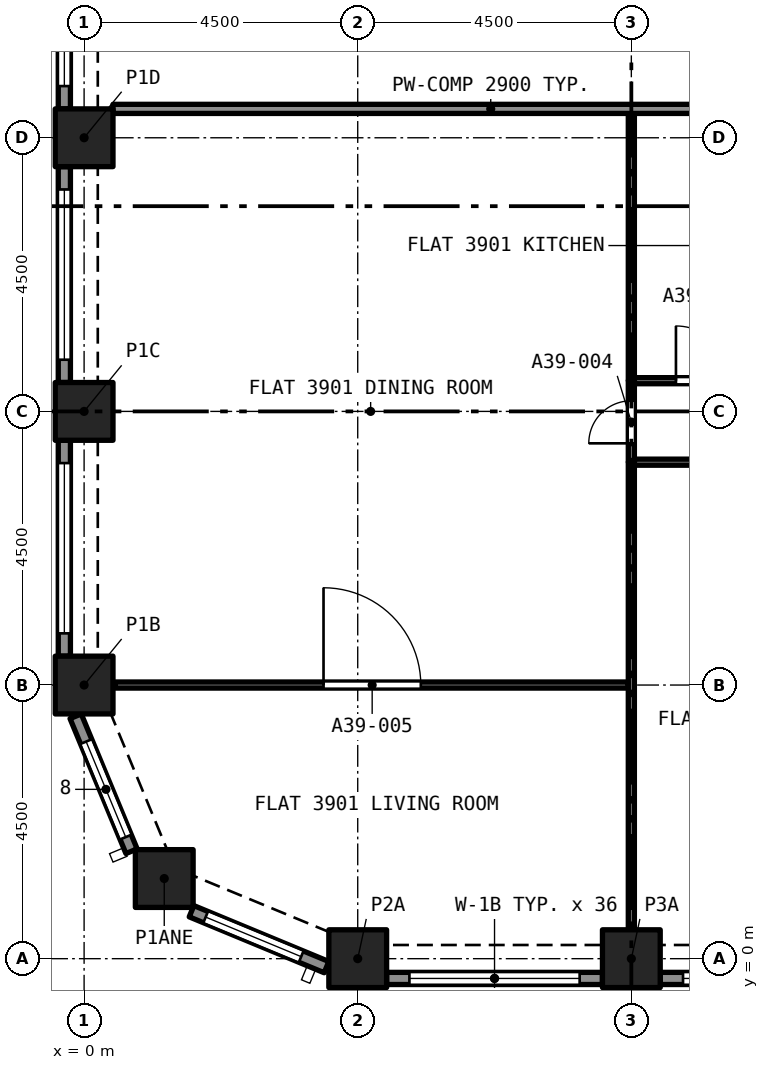
"""IFC4 building model, lengths in metres.
Left out: names, types, materials, properties, quantities, classifications, styles, units other than length and angle.
Written with IfcOpenShell. Run it as: python <this file> out.ifc"""

import sys

from ifc_helpers import new_model, si_unit, direction, frame, frame_2d, origin, origin_2d, place, context, subcontext, project, spatial, rectangle, extrude, element, fill, save


model = new_model("IFC4")
c1 = context("Model", 3, precision=1e-05, world=origin(), true_north=direction((0.0, 1.0)))
c2 = subcontext(c1, "Body", "Model", "MODEL_VIEW")
j1 = project(units=[si_unit("LENGTHUNIT", "METRE"), si_unit("PLANEANGLEUNIT", "RADIAN")], contexts=[c1])
p1 = place(None, origin())
s1 = spatial("IfcSite", under=j1, at=p1, CompositionType="ELEMENT")
p2 = place(p1, origin())
s2 = spatial("IfcBuilding", under=s1, at=p2, CompositionType="ELEMENT")
p3 = place(p2, frame((0.0, 0.0, 139.8)))
s3 = spatial("IfcBuildingStorey", under=s2, at=p3, CompositionType="ELEMENT", Elevation=139.8)
for number, where, z_axis, x_axis in (
    (1, (4.5, 0.0, 0.0), (0.0, 0.0, 1.0), (1.0, 0.0, 0.0)),
    (2, (9.0, 0.0, 0.0), (0.0, 0.0, 1.0), (1.0, 0.0, 0.0)),
    (3, (1.318, 1.318, 0.0), (0.0, 0.0, 1.0), (1.0, 0.0, 0.0)),
    (4, (0.0, 4.5, 0.0), (0.0, 0.0, 1.0), (1.0, 0.0, 0.0)),
    (5, (0.0, 9.0, 0.0), (0.0, 0.0, 1.0), (1.0, 0.0, 0.0)),
    (6, (0.0, 13.5, 0.0), (0.0, 0.0, 1.0), (1.0, 0.0, 0.0)),
):
    element("IfcColumn", number, at=place(p3, frame(where, z_axis=z_axis, x_axis=x_axis)), inside=s3, PredefinedType="COLUMN", context=c2, shape_type="SweptSolid", body=[
        extrude(rectangle(XDim=0.95, YDim=0.95, at=origin_2d()), origin(), (0.0, 0.0, 1.0), 3.2),
    ])
p4 = place(p3, frame((0.78, 1.767, 0.0), z_axis=(0.0, 0.0, 1.0), x_axis=(-0.382680855588, 0.923880599843, 0.0)))
e7 = element("IfcWall", 7, at=p4, inside=s3, PredefinedType="SOLIDWALL", context=c2, shape_type="SweptSolid", body=[
    extrude(rectangle(XDim=2.403, YDim=0.2, at=frame_2d((1.201, 0.0))), origin(), (0.0, 0.0, 1.0), 3.2),
])
p5 = place(p4, frame((0.251, 0.0, 0.45)))
e8 = element("IfcOpeningElement", 8, at=p5, cuts=e7, PredefinedType="OPENING", context=c2, shape_type="SweptSolid", body=[
    extrude(rectangle(XDim=1.7, YDim=1.95, at=frame_2d((0.85, 0.975))), frame((0.0, 0.11, 0.0), z_axis=(0.0, -1.0, 0.0), x_axis=(1.0, 0.0, 0.0)), (0.0, 0.0, 1.0), 0.22),
])
p6 = place(p3, frame((3.987, -0.139, 0.0), z_axis=(0.0, 0.0, 1.0), x_axis=(-0.923880599843, 0.382680855588, 0.0)))
e9 = element("IfcWall", 9, at=p6, inside=s3, PredefinedType="SOLIDWALL", context=c2, shape_type="SweptSolid", body=[
    extrude(rectangle(XDim=2.403, YDim=0.2, at=frame_2d((1.201, 0.0))), origin(), (0.0, 0.0, 1.0), 3.2),
])
p7 = place(p6, frame((0.451, 0.0, 0.45)))
e10 = element("IfcOpeningElement", 10, at=p7, cuts=e9, PredefinedType="OPENING", context=c2, shape_type="SweptSolid", body=[
    extrude(rectangle(XDim=1.7, YDim=1.95, at=frame_2d((0.85, 0.975))), frame((0.0, 0.11, 0.0), z_axis=(0.0, -1.0, 0.0), x_axis=(1.0, 0.0, 0.0)), (0.0, 0.0, 1.0), 0.22),
])
p8 = place(p3, frame((8.525, -0.325, 0.0), z_axis=(0.0, 0.0, 1.0), x_axis=(-1.0, 0.0, 0.0)))
e11 = element("IfcWall", 11, at=p8, inside=s3, PredefinedType="SOLIDWALL", context=c2, shape_type="SweptSolid", body=[
    extrude(rectangle(XDim=3.55, YDim=0.2, at=frame_2d((1.775, 0.0))), origin(), (0.0, 0.0, 1.0), 3.2),
])
p9 = place(p8, frame((0.375, 0.0, 0.45)))
e12 = element("IfcOpeningElement", 12, at=p9, cuts=e11, PredefinedType="OPENING", context=c2, shape_type="SweptSolid", body=[
    extrude(rectangle(XDim=2.8, YDim=1.95, at=frame_2d((1.4, 0.975))), frame((0.0, 0.11, 0.0), z_axis=(0.0, -1.0, 0.0), x_axis=(1.0, 0.0, 0.0)), (0.0, 0.0, 1.0), 0.22),
])
p10 = place(p3, frame((13.025, -0.325, 0.0), z_axis=(0.0, 0.0, 1.0), x_axis=(-1.0, 0.0, 0.0)))
e13 = element("IfcWall", 13, at=p10, inside=s3, PredefinedType="SOLIDWALL", context=c2, shape_type="SweptSolid", body=[
    extrude(rectangle(XDim=3.55, YDim=0.2, at=frame_2d((1.775, 0.0))), origin(), (0.0, 0.0, 1.0), 3.2),
])
p11 = place(p10, frame((0.375, 0.0, 0.45)))
e14 = element("IfcOpeningElement", 14, at=p11, cuts=e13, PredefinedType="OPENING", context=c2, shape_type="SweptSolid", body=[
    extrude(rectangle(XDim=2.8, YDim=1.95, at=frame_2d((1.4, 0.975))), frame((0.0, 0.11, 0.0), z_axis=(0.0, -1.0, 0.0), x_axis=(1.0, 0.0, 0.0)), (0.0, 0.0, 1.0), 0.22),
])
p12 = place(p3, frame((-0.325, 13.975, 0.0), z_axis=(0.0, 0.0, 1.0), x_axis=(0.0, 1.0, 0.0)))
e15 = element("IfcWall", 15, at=p12, inside=s3, PredefinedType="SOLIDWALL", context=c2, shape_type="SweptSolid", body=[
    extrude(rectangle(XDim=3.55, YDim=0.2, at=frame_2d((1.775, 0.0))), origin(), (0.0, 0.0, 1.0), 3.2),
])
p13 = place(p12, frame((0.375, 0.0, 0.45)))
e16 = element("IfcOpeningElement", 16, at=p13, cuts=e15, PredefinedType="OPENING", context=c2, shape_type="SweptSolid", body=[
    extrude(rectangle(XDim=2.8, YDim=1.95, at=frame_2d((1.4, 0.975))), frame((0.0, 0.11, 0.0), z_axis=(0.0, -1.0, 0.0), x_axis=(1.0, 0.0, 0.0)), (0.0, 0.0, 1.0), 0.22),
])
p14 = place(p3, frame((-0.325, 9.475, 0.0), z_axis=(0.0, 0.0, 1.0), x_axis=(0.0, 1.0, 0.0)))
e17 = element("IfcWall", 17, at=p14, inside=s3, PredefinedType="SOLIDWALL", context=c2, shape_type="SweptSolid", body=[
    extrude(rectangle(XDim=3.55, YDim=0.2, at=frame_2d((1.775, 0.0))), origin(), (0.0, 0.0, 1.0), 3.2),
])
p15 = place(p14, frame((0.375, 0.0, 0.45)))
e18 = element("IfcOpeningElement", 18, at=p15, cuts=e17, PredefinedType="OPENING", context=c2, shape_type="SweptSolid", body=[
    extrude(rectangle(XDim=2.8, YDim=1.95, at=frame_2d((1.4, 0.975))), frame((0.0, 0.11, 0.0), z_axis=(0.0, -1.0, 0.0), x_axis=(1.0, 0.0, 0.0)), (0.0, 0.0, 1.0), 0.22),
])
p16 = place(p3, frame((-0.325, 4.975, 0.0), z_axis=(0.0, 0.0, 1.0), x_axis=(0.0, 1.0, 0.0)))
e19 = element("IfcWall", 19, at=p16, inside=s3, PredefinedType="SOLIDWALL", context=c2, shape_type="SweptSolid", body=[
    extrude(rectangle(XDim=3.55, YDim=0.2, at=frame_2d((1.775, 0.0))), origin(), (0.0, 0.0, 1.0), 3.2),
])
p17 = place(p16, frame((0.375, 0.0, 0.45)))
e20 = element("IfcOpeningElement", 20, at=p17, cuts=e19, PredefinedType="OPENING", context=c2, shape_type="SweptSolid", body=[
    extrude(rectangle(XDim=2.8, YDim=1.95, at=frame_2d((1.4, 0.975))), frame((0.0, 0.11, 0.0), z_axis=(0.0, -1.0, 0.0), x_axis=(1.0, 0.0, 0.0)), (0.0, 0.0, 1.0), 0.22),
])
p18 = place(p3, frame((13.5, 8.165, 0.0), z_axis=(0.0, 0.0, 1.0), x_axis=(-1.0, 0.0, 0.0)))
e21 = element("IfcWall", 21, at=p18, inside=s3, PredefinedType="PARTITIONING", context=c2, shape_type="SweptSolid", body=[
    extrude(rectangle(XDim=4.45, YDim=0.1, at=frame_2d((2.225, 0.0))), origin(), (0.0, 0.0, 1.0), 2.9),
])
p19 = place(p18, frame((1.8, 0.0, 0.0)))
e22 = element("IfcOpeningElement", 22, at=p19, cuts=e21, PredefinedType="OPENING", context=c2, shape_type="SweptSolid", body=[
    extrude(rectangle(XDim=0.9, YDim=2.1, at=frame_2d((0.45, 1.05))), frame((0.0, 0.06, 0.0), z_axis=(0.0, -1.0, 0.0), x_axis=(1.0, 0.0, 0.0)), (0.0, 0.0, 1.0), 0.12),
])
p20 = place(p3, frame((9.0, 0.475, 0.0), z_axis=(0.0, 0.0, 1.0), x_axis=(0.0, 1.0, 0.0)))
e23 = element("IfcWall", 23, at=p20, inside=s3, PredefinedType="PARTITIONING", context=c2, shape_type="SweptSolid", body=[
    extrude(rectangle(XDim=7.69, YDim=0.1, at=frame_2d((3.845, 0.0))), origin(), (0.0, 0.0, 1.0), 2.9),
])
p21 = place(p3, frame((9.0, 8.165, 0.0), z_axis=(0.0, 0.0, 1.0), x_axis=(0.0, 1.0, 0.0)))
e24 = element("IfcWall", 24, at=p21, inside=s3, PredefinedType="PARTITIONING", context=c2, shape_type="SweptSolid", body=[
    extrude(rectangle(XDim=1.34, YDim=0.1, at=frame_2d((0.67, 0.0))), origin(), (0.0, 0.0, 1.0), 2.9),
])
p22 = place(p21, frame((0.31, 0.0, 0.0)))
e25 = element("IfcOpeningElement", 25, at=p22, cuts=e24, PredefinedType="OPENING", context=c2, shape_type="SweptSolid", body=[
    extrude(rectangle(XDim=0.7, YDim=2.1, at=frame_2d((0.35, 1.05))), frame((0.0, 0.06, 0.0), z_axis=(0.0, -1.0, 0.0), x_axis=(1.0, 0.0, 0.0)), (0.0, 0.0, 1.0), 0.12),
])
p23 = place(p3, frame((9.0, 9.505, 0.0), z_axis=(0.0, 0.0, 1.0), x_axis=(0.0, 1.0, 0.0)))
e26 = element("IfcWall", 26, at=p23, inside=s3, PredefinedType="PARTITIONING", context=c2, shape_type="SweptSolid", body=[
    extrude(rectangle(XDim=4.395, YDim=0.1, at=frame_2d((2.198, 0.0))), origin(), (0.0, 0.0, 1.0), 2.9),
])
p24 = place(p3, frame((0.514, 4.5, 0.0), z_axis=(0.0, 0.0, 1.0), x_axis=(1.0, 0.0, 0.0)))
e27 = element("IfcWall", 27, at=p24, inside=s3, PredefinedType="PARTITIONING", context=c2, shape_type="SweptSolid", body=[
    extrude(rectangle(XDim=8.436, YDim=0.1, at=frame_2d((4.218, 0.0))), origin(), (0.0, 0.0, 1.0), 2.9),
])
p25 = place(p24, frame((3.423, 0.0, 0.0)))
e28 = element("IfcOpeningElement", 28, at=p25, cuts=e27, PredefinedType="OPENING", context=c2, shape_type="SweptSolid", body=[
    extrude(rectangle(XDim=1.6, YDim=2.1, at=frame_2d((0.8, 1.05))), frame((0.0, 0.06, 0.0), z_axis=(0.0, -1.0, 0.0), x_axis=(1.0, 0.0, 0.0)), (0.0, 0.0, 1.0), 0.12),
])
p26 = place(p3, frame((0.475, 13.975, 0.0), z_axis=(0.0, 0.0, 1.0), x_axis=(1.0, 0.0, 0.0)))
e29 = element("IfcWall", 29, at=p26, inside=s3, PredefinedType="PARTITIONING", context=c2, shape_type="SweptSolid", body=[
    extrude(rectangle(XDim=12.425, YDim=0.15, at=frame_2d((6.212, 0.0))), origin(), (0.0, 0.0, 1.0), 2.9),
])
p27 = place(p3, frame((9.05, 9.505, 0.0), z_axis=(0.0, 0.0, 1.0), x_axis=(1.0, 0.0, 0.0)))
e30 = element("IfcWall", 30, at=p27, inside=s3, PredefinedType="PARTITIONING", context=c2, shape_type="SweptSolid", body=[
    extrude(rectangle(XDim=2.317, YDim=0.1, at=frame_2d((1.159, 0.0))), origin(), (0.0, 0.0, 1.0), 2.9),
])
p28 = place(p27, frame((0.684, 0.0, 0.0)))
e31 = element("IfcOpeningElement", 31, at=p28, cuts=e30, PredefinedType="OPENING", context=c2, shape_type="SweptSolid", body=[
    extrude(rectangle(XDim=0.9, YDim=2.1, at=frame_2d((0.45, 1.05))), frame((0.0, 0.06, 0.0), z_axis=(0.0, -1.0, 0.0), x_axis=(1.0, 0.0, 0.0)), (0.0, 0.0, 1.0), 0.12),
])
p29 = place(p5, origin())
e32 = element("IfcWindow", 32, at=p29, inside=s3, PartitioningType="SINGLE_PANEL", PredefinedType="WINDOW", context=c2, shape_type="SweptSolid", body=[
    extrude(rectangle(XDim=1.7, YDim=1.95, at=frame_2d((0.85, 0.975))), frame((0.0, 0.03, 0.0), z_axis=(0.0, -1.0, 0.0), x_axis=(1.0, 0.0, 0.0)), (0.0, 0.0, 1.0), 0.06),
])
fill(e8, e32)
p30 = place(p7, origin())
e33 = element("IfcWindow", 33, at=p30, inside=s3, PartitioningType="SINGLE_PANEL", PredefinedType="WINDOW", context=c2, shape_type="SweptSolid", body=[
    extrude(rectangle(XDim=1.7, YDim=1.95, at=frame_2d((0.85, 0.975))), frame((0.0, 0.03, 0.0), z_axis=(0.0, -1.0, 0.0), x_axis=(1.0, 0.0, 0.0)), (0.0, 0.0, 1.0), 0.06),
])
fill(e10, e33)
p31 = place(p9, origin())
e34 = element("IfcWindow", 34, at=p31, inside=s3, PartitioningType="SINGLE_PANEL", PredefinedType="WINDOW", context=c2, shape_type="SweptSolid", body=[
    extrude(rectangle(XDim=2.8, YDim=1.95, at=frame_2d((1.4, 0.975))), frame((0.0, 0.03, 0.0), z_axis=(0.0, -1.0, 0.0), x_axis=(1.0, 0.0, 0.0)), (0.0, 0.0, 1.0), 0.06),
])
fill(e12, e34)
p32 = place(p11, origin())
e35 = element("IfcWindow", 35, at=p32, inside=s3, PartitioningType="SINGLE_PANEL", PredefinedType="WINDOW", context=c2, shape_type="SweptSolid", body=[
    extrude(rectangle(XDim=2.8, YDim=1.95, at=frame_2d((1.4, 0.975))), frame((0.0, 0.03, 0.0), z_axis=(0.0, -1.0, 0.0), x_axis=(1.0, 0.0, 0.0)), (0.0, 0.0, 1.0), 0.06),
])
fill(e14, e35)
p33 = place(p13, origin())
e36 = element("IfcWindow", 36, at=p33, inside=s3, PartitioningType="SINGLE_PANEL", PredefinedType="WINDOW", context=c2, shape_type="SweptSolid", body=[
    extrude(rectangle(XDim=2.8, YDim=1.95, at=frame_2d((1.4, 0.975))), frame((0.0, 0.03, 0.0), z_axis=(0.0, -1.0, 0.0), x_axis=(1.0, 0.0, 0.0)), (0.0, 0.0, 1.0), 0.06),
])
fill(e16, e36)
p34 = place(p15, origin())
e37 = element("IfcWindow", 37, at=p34, inside=s3, PartitioningType="SINGLE_PANEL", PredefinedType="WINDOW", context=c2, shape_type="SweptSolid", body=[
    extrude(rectangle(XDim=2.8, YDim=1.95, at=frame_2d((1.4, 0.975))), frame((0.0, 0.03, 0.0), z_axis=(0.0, -1.0, 0.0), x_axis=(1.0, 0.0, 0.0)), (0.0, 0.0, 1.0), 0.06),
])
fill(e18, e37)
p35 = place(p17, origin())
e38 = element("IfcWindow", 38, at=p35, inside=s3, PartitioningType="SINGLE_PANEL", PredefinedType="WINDOW", context=c2, shape_type="SweptSolid", body=[
    extrude(rectangle(XDim=2.8, YDim=1.95, at=frame_2d((1.4, 0.975))), frame((0.0, 0.03, 0.0), z_axis=(0.0, -1.0, 0.0), x_axis=(1.0, 0.0, 0.0)), (0.0, 0.0, 1.0), 0.06),
])
fill(e20, e38)
p36 = place(p22, origin())
e39 = element("IfcDoor", 39, at=p36, inside=s3, OperationType="SINGLE_SWING_LEFT", PredefinedType="DOOR", context=c2, shape_type="SweptSolid", body=[
    extrude(rectangle(XDim=0.7, YDim=2.1, at=frame_2d((0.35, 1.05))), frame((0.0, 0.025, 0.0), z_axis=(0.0, -1.0, 0.0), x_axis=(1.0, 0.0, 0.0)), (0.0, 0.0, 1.0), 0.05),
])
fill(e25, e39)
p37 = place(p25, origin())
e40 = element("IfcDoor", 40, at=p37, inside=s3, OperationType="SINGLE_SWING_RIGHT", PredefinedType="DOOR", context=c2, shape_type="SweptSolid", body=[
    extrude(rectangle(XDim=1.6, YDim=2.1, at=frame_2d((0.8, 1.05))), frame((0.0, 0.025, 0.0), z_axis=(0.0, -1.0, 0.0), x_axis=(1.0, 0.0, 0.0)), (0.0, 0.0, 1.0), 0.05),
])
fill(e28, e40)
p38 = place(p28, origin())
e41 = element("IfcDoor", 41, at=p38, inside=s3, OperationType="SINGLE_SWING_LEFT", PredefinedType="DOOR", context=c2, shape_type="SweptSolid", body=[
    extrude(rectangle(XDim=0.9, YDim=2.1, at=frame_2d((0.45, 1.05))), frame((0.0, 0.025, 0.0), z_axis=(0.0, -1.0, 0.0), x_axis=(1.0, 0.0, 0.0)), (0.0, 0.0, 1.0), 0.05),
])
fill(e31, e41)
save(model, sys.argv[1])
